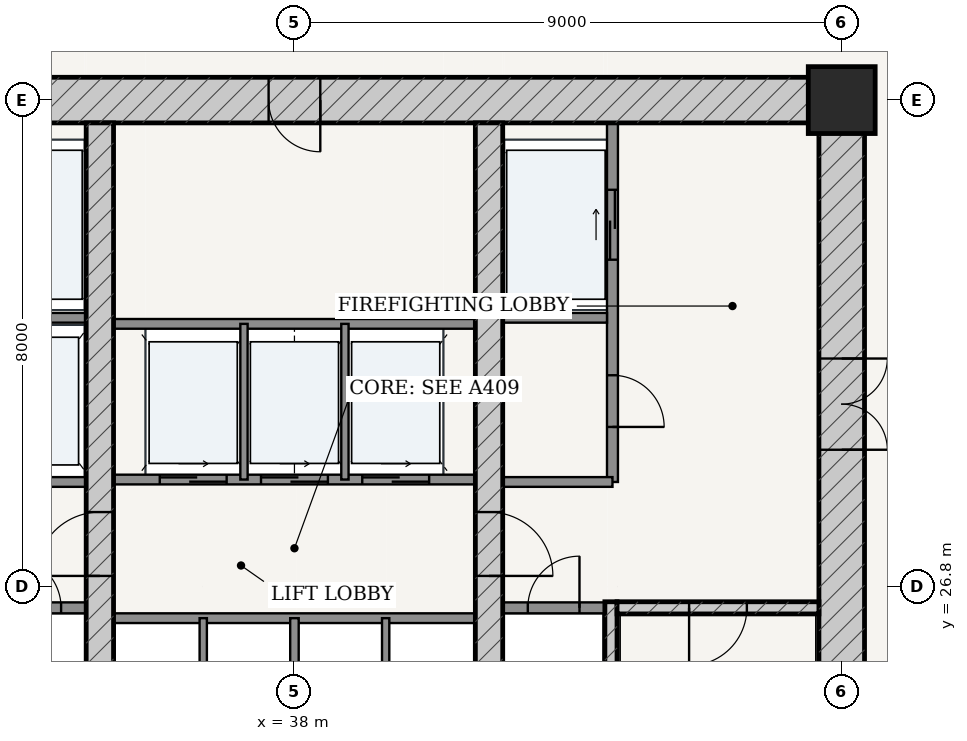
"""IFC4 building model, lengths in metres.
Left out: names, types, materials, properties, quantities, classifications, styles, units other than length and angle.
Written with IfcOpenShell. Run it as: python <this file> out.ifc"""

import sys

from ifc_helpers import new_model, si_unit, direction, frame, frame_2d, origin, origin_2d, place, context, subcontext, project, spatial, rectangle, extrude, source, transform, mapped, element, fill, save


model = new_model("IFC4")
c1 = context("Model", 3, precision=1e-05, world=origin(), true_north=direction((-0.2419218956, 0.970295726276)))
c2 = subcontext(c1, "Body", "Model", "MODEL_VIEW")
j1 = project(units=[si_unit("LENGTHUNIT", "METRE"), si_unit("PLANEANGLEUNIT", "RADIAN")], contexts=[c1])
p1 = place(None, origin())
s1 = spatial("IfcSite", under=j1, at=p1, CompositionType="ELEMENT")
p2 = place(p1, origin())
s2 = spatial("IfcBuilding", under=s1, at=p2, CompositionType="ELEMENT")
p3 = place(p2, frame((0.0, 0.0, 27.6)))
s3 = spatial("IfcBuildingStorey", under=s2, at=p3, CompositionType="ELEMENT", Elevation=27.6)
p4 = place(p3, frame((47.0, 34.8, 0.0), z_axis=(0.0, 0.0, 1.0), x_axis=(1.0, 0.0, 0.0)))
e1 = element("IfcColumn", 1, at=p4, inside=s3, PredefinedType="COLUMN", context=c2, shape_type="SweptSolid", body=[
    extrude(rectangle(XDim=1.1, YDim=1.1, at=origin_2d()), origin(), (0.0, 0.0, 1.0), 3.6),
])
p5 = place(p3, frame((28.625, 34.8, 0.0), z_axis=(0.0, 0.0, 1.0), x_axis=(1.0, 0.0, 0.0)))
e2 = element("IfcWall", 2, at=p5, inside=s3, PredefinedType="SHEAR", context=c2, shape_type="SweptSolid", body=[
    extrude(rectangle(XDim=18.75, YDim=0.75, at=frame_2d((9.375, 0.0))), origin(), (0.0, 0.0, 1.0), 3.32),
])
p6 = place(p5, frame((8.95, 0.0, 0.0)))
e3 = element("IfcOpeningElement", 3, at=p6, cuts=e2, PredefinedType="OPENING", context=c2, shape_type="SweptSolid", body=[
    extrude(rectangle(XDim=0.85, YDim=2.1, at=frame_2d((0.425, 1.05))), frame((0.0, 0.385, 0.0), z_axis=(0.0, -1.0, 0.0), x_axis=(1.0, 0.0, 0.0)), (0.0, 0.0, 1.0), 0.77),
])
p7 = place(p3, frame((47.0, 19.175, 0.0), z_axis=(0.0, 0.0, 1.0), x_axis=(0.0, 1.0, 0.0)))
e4 = element("IfcWall", 4, at=p7, inside=s3, PredefinedType="SHEAR", context=c2, shape_type="SweptSolid", body=[
    extrude(rectangle(XDim=15.25, YDim=0.75, at=frame_2d((7.625, 0.0))), origin(), (0.0, 0.0, 1.0), 3.32),
])
p8 = place(p7, frame((9.875, 0.0, 0.0)))
e5 = element("IfcOpeningElement", 5, at=p8, cuts=e4, PredefinedType="OPENING", context=c2, shape_type="SweptSolid", body=[
    extrude(rectangle(XDim=1.5, YDim=2.2, at=frame_2d((0.75, 1.1))), frame((0.0, 0.385, 0.0), z_axis=(0.0, -1.0, 0.0), x_axis=(1.0, 0.0, 0.0)), (0.0, 0.0, 1.0), 0.77),
])
p9 = place(p3, frame((43.205, 19.175, 0.0), z_axis=(0.0, 0.0, 1.0), x_axis=(0.0, 1.0, 0.0)))
e6 = element("IfcWall", 6, at=p9, inside=s3, PredefinedType="SOLIDWALL", context=c2, shape_type="SweptSolid", body=[
    extrude(rectangle(XDim=7.375, YDim=0.2, at=frame_2d((3.688, 0.0))), origin(), (0.0, 0.0, 1.0), 3.32),
])
p10 = place(p3, frame((43.305, 26.45, 0.0), z_axis=(0.0, 0.0, 1.0), x_axis=(1.0, 0.0, 0.0)))
e7 = element("IfcWall", 7, at=p10, inside=s3, PredefinedType="SOLIDWALL", context=c2, shape_type="SweptSolid", body=[
    extrude(rectangle(XDim=3.32, YDim=0.2, at=frame_2d((1.66, 0.0))), origin(), (0.0, 0.0, 1.0), 3.32),
])
p11 = place(p10, frame((1.185, 0.0, 0.0)))
e8 = element("IfcOpeningElement", 8, at=p11, cuts=e7, PredefinedType="OPENING", context=c2, shape_type="SweptSolid", body=[
    extrude(rectangle(XDim=0.95, YDim=2.15, at=frame_2d((0.475, 1.075))), frame((0.0, 0.11, 0.0), z_axis=(0.0, -1.0, 0.0), x_axis=(1.0, 0.0, 0.0)), (0.0, 0.0, 1.0), 0.22),
])
p12 = place(p3, frame((34.8, 19.175, 0.0), z_axis=(0.0, 0.0, 1.0), x_axis=(0.0, 1.0, 0.0)))
e9 = element("IfcWall", 9, at=p12, inside=s3, PredefinedType="SHEAR", context=c2, shape_type="SweptSolid", body=[
    extrude(rectangle(XDim=15.25, YDim=0.45, at=frame_2d((7.625, 0.0))), origin(), (0.0, 0.0, 1.0), 3.32),
])
p13 = place(p12, frame((7.8, 0.0, 0.0)))
e10 = element("IfcOpeningElement", 10, at=p13, cuts=e9, PredefinedType="OPENING", context=c2, shape_type="SweptSolid", body=[
    extrude(rectangle(XDim=1.05, YDim=2.15, at=frame_2d((0.525, 1.075))), frame((0.0, 0.235, 0.0), z_axis=(0.0, -1.0, 0.0), x_axis=(1.0, 0.0, 0.0)), (0.0, 0.0, 1.0), 0.47),
])
p14 = place(p3, frame((41.2, 19.175, 0.0), z_axis=(0.0, 0.0, 1.0), x_axis=(0.0, 1.0, 0.0)))
e11 = element("IfcWall", 11, at=p14, inside=s3, PredefinedType="SHEAR", context=c2, shape_type="SweptSolid", body=[
    extrude(rectangle(XDim=15.25, YDim=0.45, at=frame_2d((7.625, 0.0))), origin(), (0.0, 0.0, 1.0), 3.32),
])
p15 = place(p14, frame((7.8, 0.0, 0.0)))
e12 = element("IfcOpeningElement", 12, at=p15, cuts=e11, PredefinedType="OPENING", context=c2, shape_type="SweptSolid", body=[
    extrude(rectangle(XDim=1.05, YDim=2.15, at=frame_2d((0.525, 1.075))), frame((0.0, 0.235, 0.0), z_axis=(0.0, -1.0, 0.0), x_axis=(1.0, 0.0, 0.0)), (0.0, 0.0, 1.0), 0.47),
])
p16 = place(p3, frame((32.9, 26.45, 0.0), z_axis=(0.0, 0.0, 1.0), x_axis=(1.0, 0.0, 0.0)))
e13 = element("IfcWall", 13, at=p16, inside=s3, PredefinedType="PARTITIONING", context=c2, shape_type="SweptSolid", body=[
    extrude(rectangle(XDim=1.675, YDim=0.18, at=frame_2d((0.837, 0.0))), origin(), (0.0, 0.0, 1.0), 3.32),
])
p17 = place(p16, frame((0.413, 0.0, 0.0)))
e14 = element("IfcOpeningElement", 14, at=p17, cuts=e13, PredefinedType="OPENING", context=c2, shape_type="SweptSolid", body=[
    extrude(rectangle(XDim=0.85, YDim=2.1, at=frame_2d((0.425, 1.05))), frame((0.0, 0.1, 0.0), z_axis=(0.0, -1.0, 0.0), x_axis=(1.0, 0.0, 0.0)), (0.0, 0.0, 1.0), 0.2),
])
p18 = place(p3, frame((41.425, 26.45, 0.0), z_axis=(0.0, 0.0, 1.0), x_axis=(1.0, 0.0, 0.0)))
e15 = element("IfcWall", 15, at=p18, inside=s3, PredefinedType="PARTITIONING", context=c2, shape_type="SweptSolid", body=[
    extrude(rectangle(XDim=1.675, YDim=0.18, at=frame_2d((0.837, 0.0))), origin(), (0.0, 0.0, 1.0), 3.32),
])
p19 = place(p18, frame((0.413, 0.0, 0.0)))
e16 = element("IfcOpeningElement", 16, at=p19, cuts=e15, PredefinedType="OPENING", context=c2, shape_type="SweptSolid", body=[
    extrude(rectangle(XDim=0.85, YDim=2.1, at=frame_2d((0.425, 1.05))), frame((0.0, 0.1, 0.0), z_axis=(0.0, -1.0, 0.0), x_axis=(1.0, 0.0, 0.0)), (0.0, 0.0, 1.0), 0.2),
])
p20 = place(p3, frame((32.86, 31.22, 0.0), z_axis=(0.0, 0.0, 1.0), x_axis=(1.0, 0.0, 0.0)))
e17 = element("IfcWall", 17, at=p20, inside=s3, PredefinedType="PARTITIONING", context=c2, shape_type="SweptSolid", body=[
    extrude(rectangle(XDim=1.715, YDim=0.16, at=frame_2d((0.857, 0.0))), origin(), (0.0, 0.0, 1.0), 3.32),
])
p21 = place(p3, frame((32.77, 28.52, 0.0), z_axis=(0.0, 0.0, 1.0), x_axis=(1.0, 0.0, 0.0)))
e18 = element("IfcWall", 18, at=p21, inside=s3, PredefinedType="PARTITIONING", context=c2, shape_type="SweptSolid", body=[
    extrude(rectangle(XDim=1.805, YDim=0.16, at=frame_2d((0.902, 0.0))), origin(), (0.0, 0.0, 1.0), 3.32),
])
p22 = place(p3, frame((43.23, 28.52, 0.0), z_axis=(0.0, 0.0, 1.0), x_axis=(0.0, 1.0, 0.0)))
e19 = element("IfcWall", 19, at=p22, inside=s3, PredefinedType="PARTITIONING", context=c2, shape_type="SweptSolid", body=[
    extrude(rectangle(XDim=5.905, YDim=0.18, at=frame_2d((2.953, 0.0))), origin(), (0.0, 0.0, 1.0), 3.32),
])
p23 = place(p22, frame((0.905, 0.0, 0.0)))
e20 = element("IfcOpeningElement", 20, at=p23, cuts=e19, PredefinedType="OPENING", context=c2, shape_type="SweptSolid", body=[
    extrude(rectangle(XDim=0.85, YDim=2.1, at=frame_2d((0.425, 1.05))), frame((0.0, 0.1, 0.0), z_axis=(0.0, -1.0, 0.0), x_axis=(1.0, 0.0, 0.0)), (0.0, 0.0, 1.0), 0.2),
])
p24 = place(p22, frame((3.655, 0.0, 0.0)))
e21 = element("IfcOpeningElement", 21, at=p24, cuts=e19, PredefinedType="OPENING", context=c2, shape_type="SweptSolid", body=[
    extrude(rectangle(XDim=1.15, YDim=2.2, at=frame_2d((0.575, 1.1))), frame((0.0, 0.1, 0.0), z_axis=(0.0, -1.0, 0.0), x_axis=(1.0, 0.0, 0.0)), (0.0, 0.0, 1.0), 0.2),
])
p25 = place(p3, frame((41.425, 31.22, 0.0), z_axis=(0.0, 0.0, 1.0), x_axis=(1.0, 0.0, 0.0)))
e22 = element("IfcWall", 22, at=p25, inside=s3, PredefinedType="PARTITIONING", context=c2, shape_type="SweptSolid", body=[
    extrude(rectangle(XDim=1.715, YDim=0.16, at=frame_2d((0.857, 0.0))), origin(), (0.0, 0.0, 1.0), 3.32),
])
p26 = place(p3, frame((41.425, 28.52, 0.0), z_axis=(0.0, 0.0, 1.0), x_axis=(1.0, 0.0, 0.0)))
e23 = element("IfcWall", 23, at=p26, inside=s3, PredefinedType="PARTITIONING", context=c2, shape_type="SweptSolid", body=[
    extrude(rectangle(XDim=1.805, YDim=0.16, at=frame_2d((0.902, 0.0))), origin(), (0.0, 0.0, 1.0), 3.32),
])
p27 = place(p3, frame((35.025, 28.56, 0.0), z_axis=(0.0, 0.0, 1.0), x_axis=(1.0, 0.0, 0.0)))
e24 = element("IfcWall", 24, at=p27, inside=s3, PredefinedType="PARTITIONING", context=c2, shape_type="SweptSolid", body=[
    extrude(rectangle(XDim=5.95, YDim=0.16, at=frame_2d((2.975, 0.0))), origin(), (0.0, 0.0, 1.0), 3.32),
])
p28 = place(p27, frame((0.76, 0.0, 0.0)))
e25 = element("IfcOpeningElement", 25, at=p28, cuts=e24, PredefinedType="OPENING", context=c2, shape_type="SweptSolid", body=[
    extrude(rectangle(XDim=1.1, YDim=2.2, at=frame_2d((0.55, 1.1))), frame((0.0, 0.09, 0.0), z_axis=(0.0, -1.0, 0.0), x_axis=(1.0, 0.0, 0.0)), (0.0, 0.0, 1.0), 0.18),
])
p29 = place(p27, frame((2.425, 0.0, 0.0)))
e26 = element("IfcOpeningElement", 26, at=p29, cuts=e24, PredefinedType="OPENING", context=c2, shape_type="SweptSolid", body=[
    extrude(rectangle(XDim=1.1, YDim=2.2, at=frame_2d((0.55, 1.1))), frame((0.0, 0.09, 0.0), z_axis=(0.0, -1.0, 0.0), x_axis=(1.0, 0.0, 0.0)), (0.0, 0.0, 1.0), 0.18),
])
p30 = place(p27, frame((4.09, 0.0, 0.0)))
e27 = element("IfcOpeningElement", 27, at=p30, cuts=e24, PredefinedType="OPENING", context=c2, shape_type="SweptSolid", body=[
    extrude(rectangle(XDim=1.1, YDim=2.2, at=frame_2d((0.55, 1.1))), frame((0.0, 0.09, 0.0), z_axis=(0.0, -1.0, 0.0), x_axis=(1.0, 0.0, 0.0)), (0.0, 0.0, 1.0), 0.18),
])
p31 = place(p3, frame((35.025, 31.12, 0.0), z_axis=(0.0, 0.0, 1.0), x_axis=(1.0, 0.0, 0.0)))
e28 = element("IfcWall", 28, at=p31, inside=s3, PredefinedType="PARTITIONING", context=c2, shape_type="SweptSolid", body=[
    extrude(rectangle(XDim=5.95, YDim=0.16, at=frame_2d((2.975, 0.0))), origin(), (0.0, 0.0, 1.0), 3.32),
])
for number, where, z_axis, x_axis in (
    (29, (37.17, 28.56, 0.0), (0.0, 0.0, 1.0), (0.0, 1.0, 0.0)),
    (30, (38.83, 28.56, 0.0), (0.0, 0.0, 1.0), (0.0, 1.0, 0.0)),
):
    element("IfcWall", number, at=place(p3, frame(where, z_axis=z_axis, x_axis=x_axis)), inside=s3, PredefinedType="PARTITIONING", context=c2, shape_type="SweptSolid", body=[
        extrude(rectangle(XDim=2.56, YDim=0.12, at=frame_2d((1.28, 0.0))), origin(), (0.0, 0.0, 1.0), 3.32),
    ])
p32 = place(p3, frame((35.025, 26.28, 0.0), z_axis=(0.0, 0.0, 1.0), x_axis=(1.0, 0.0, 0.0)))
e31 = element("IfcWall", 31, at=p32, inside=s3, PredefinedType="PARTITIONING", context=c2, shape_type="SweptSolid", body=[
    extrude(rectangle(XDim=5.95, YDim=0.16, at=frame_2d((2.975, 0.0))), origin(), (0.0, 0.0, 1.0), 3.32),
])
p33 = place(p3, frame((36.5, 23.72, 0.0), z_axis=(0.0, 0.0, 1.0), x_axis=(0.0, 1.0, 0.0)))
e32 = element("IfcWall", 32, at=p33, inside=s3, PredefinedType="PARTITIONING", context=c2, shape_type="SweptSolid", body=[
    extrude(rectangle(XDim=2.56, YDim=0.12, at=frame_2d((1.28, 0.0))), origin(), (0.0, 0.0, 1.0), 3.32),
])
p34 = place(p3, frame((38.0, 23.72, 0.0), z_axis=(0.0, 0.0, 1.0), x_axis=(0.0, 1.0, 0.0)))
e33 = element("IfcWall", 33, at=p34, inside=s3, PredefinedType="PARTITIONING", context=c2, shape_type="SweptSolid", body=[
    extrude(rectangle(XDim=2.56, YDim=0.14, at=frame_2d((1.28, 0.0))), origin(), (0.0, 0.0, 1.0), 3.32),
])
p35 = place(p3, frame((39.5, 23.72, 0.0), z_axis=(0.0, 0.0, 1.0), x_axis=(0.0, 1.0, 0.0)))
e34 = element("IfcWall", 34, at=p35, inside=s3, PredefinedType="PARTITIONING", context=c2, shape_type="SweptSolid", body=[
    extrude(rectangle(XDim=2.56, YDim=0.12, at=frame_2d((1.28, 0.0))), origin(), (0.0, 0.0, 1.0), 3.32),
])
m1 = source(origin(), c2, "Body", "SweptSolid", [
    extrude(rectangle(XDim=1.5, YDim=2.2, at=frame_2d((0.75, 1.1))), frame((0.0, 0.025, 0.0), z_axis=(0.0, -1.0, 0.0), x_axis=(1.0, 0.0, 0.0)), (0.0, 0.0, 1.0), 0.05),
])
p36 = place(p8, frame((1.5, 0.0, 0.0), z_axis=(0.0, 0.0, 1.0), x_axis=(-1.0, 0.0, 0.0)))
e35 = element("IfcDoor", 35, at=p36, inside=s3, OperationType="DOUBLE_DOOR_SINGLE_SWING", PredefinedType="DOOR", context=c2, shape_type="MappedRepresentation", body=[
    mapped(m1, transform((0.0, 0.0, 0.0), scale=1.0)),
])
fill(e5, e35)
m2 = source(origin(), c2, "Body", "SweptSolid", [
    extrude(rectangle(XDim=1.05, YDim=2.15, at=frame_2d((0.525, 1.075))), frame((0.0, 0.025, 0.0), z_axis=(0.0, -1.0, 0.0), x_axis=(1.0, 0.0, 0.0)), (0.0, 0.0, 1.0), 0.05),
])
p37 = place(p13, origin())
e36 = element("IfcDoor", 36, at=p37, inside=s3, OperationType="SINGLE_SWING_LEFT", PredefinedType="DOOR", context=c2, shape_type="MappedRepresentation", body=[
    mapped(m2, transform((0.0, 0.0, 0.0), scale=1.0)),
])
fill(e10, e36)
p38 = place(p15, frame((1.05, 0.0, 0.0), z_axis=(0.0, 0.0, 1.0), x_axis=(-1.0, 0.0, 0.0)))
e37 = element("IfcDoor", 37, at=p38, inside=s3, OperationType="SINGLE_SWING_RIGHT", PredefinedType="DOOR", context=c2, shape_type="MappedRepresentation", body=[
    mapped(m2, transform((0.0, 0.0, 0.0), scale=1.0)),
])
fill(e12, e37)
m3 = source(origin(), c2, "Body", "SweptSolid", [
    extrude(rectangle(XDim=0.95, YDim=2.15, at=frame_2d((0.475, 1.075))), frame((0.0, 0.025, 0.0), z_axis=(0.0, -1.0, 0.0), x_axis=(1.0, 0.0, 0.0)), (0.0, 0.0, 1.0), 0.05),
])
p39 = place(p11, frame((0.95, 0.0, 0.0), z_axis=(0.0, 0.0, 1.0), x_axis=(-1.0, 0.0, 0.0)))
e38 = element("IfcDoor", 38, at=p39, inside=s3, OperationType="SINGLE_SWING_RIGHT", PredefinedType="DOOR", context=c2, shape_type="MappedRepresentation", body=[
    mapped(m3, transform((0.0, 0.0, 0.0), scale=1.0)),
])
fill(e8, e38)
m4 = source(origin(), c2, "Body", "SweptSolid", [
    extrude(rectangle(XDim=0.85, YDim=2.1, at=frame_2d((0.425, 1.05))), frame((0.0, 0.025, 0.0), z_axis=(0.0, -1.0, 0.0), x_axis=(1.0, 0.0, 0.0)), (0.0, 0.0, 1.0), 0.05),
])
p40 = place(p17, origin())
e39 = element("IfcDoor", 39, at=p40, inside=s3, OperationType="SINGLE_SWING_LEFT", PredefinedType="DOOR", context=c2, shape_type="MappedRepresentation", body=[
    mapped(m4, transform((0.0, 0.0, 0.0), scale=1.0)),
])
fill(e14, e39)
p41 = place(p19, origin())
e40 = element("IfcDoor", 40, at=p41, inside=s3, OperationType="SINGLE_SWING_RIGHT", PredefinedType="DOOR", context=c2, shape_type="MappedRepresentation", body=[
    mapped(m4, transform((0.0, 0.0, 0.0), scale=1.0)),
])
fill(e16, e40)
p42 = place(p23, frame((0.85, 0.0, 0.0), z_axis=(0.0, 0.0, 1.0), x_axis=(-1.0, 0.0, 0.0)))
e41 = element("IfcDoor", 41, at=p42, inside=s3, OperationType="SINGLE_SWING_RIGHT", PredefinedType="DOOR", context=c2, shape_type="MappedRepresentation", body=[
    mapped(m4, transform((0.0, 0.0, 0.0), scale=1.0)),
])
fill(e20, e41)
p43 = place(p6, frame((0.85, 0.0, 0.0), z_axis=(0.0, 0.0, 1.0), x_axis=(-1.0, 0.0, 0.0)))
e42 = element("IfcDoor", 42, at=p43, inside=s3, OperationType="SINGLE_SWING_LEFT", PredefinedType="DOOR", context=c2, shape_type="MappedRepresentation", body=[
    mapped(m4, transform((0.0, 0.0, 0.0), scale=1.0)),
])
fill(e3, e42)
m5 = source(origin(), c2, "Body", "SweptSolid", [
    extrude(rectangle(XDim=1.15, YDim=2.2, at=frame_2d((0.575, 1.1))), frame((0.0, 0.025, 0.0), z_axis=(0.0, -1.0, 0.0), x_axis=(1.0, 0.0, 0.0)), (0.0, 0.0, 1.0), 0.05),
])
p44 = place(p24, origin())
e43 = element("IfcDoor", 43, at=p44, inside=s3, OperationType="DOUBLE_DOOR_SLIDING", PredefinedType="DOOR", context=c2, shape_type="MappedRepresentation", body=[
    mapped(m5, transform((0.0, 0.0, 0.0), scale=1.0)),
])
fill(e21, e43)
m6 = source(origin(), c2, "Body", "SweptSolid", [
    extrude(rectangle(XDim=1.1, YDim=2.2, at=frame_2d((0.55, 1.1))), frame((0.0, 0.025, 0.0), z_axis=(0.0, -1.0, 0.0), x_axis=(1.0, 0.0, 0.0)), (0.0, 0.0, 1.0), 0.05),
])
p45 = place(p28, origin())
e44 = element("IfcDoor", 44, at=p45, inside=s3, OperationType="DOUBLE_DOOR_SLIDING", PredefinedType="DOOR", context=c2, shape_type="MappedRepresentation", body=[
    mapped(m6, transform((0.0, 0.0, 0.0), scale=1.0)),
])
fill(e25, e44)
p46 = place(p29, origin())
e45 = element("IfcDoor", 45, at=p46, inside=s3, OperationType="DOUBLE_DOOR_SLIDING", PredefinedType="DOOR", context=c2, shape_type="MappedRepresentation", body=[
    mapped(m6, transform((0.0, 0.0, 0.0), scale=1.0)),
])
fill(e26, e45)
p47 = place(p30, origin())
e46 = element("IfcDoor", 46, at=p47, inside=s3, OperationType="DOUBLE_DOOR_SLIDING", PredefinedType="DOOR", context=c2, shape_type="MappedRepresentation", body=[
    mapped(m6, transform((0.0, 0.0, 0.0), scale=1.0)),
])
fill(e27, e46)
save(model, sys.argv[1])
